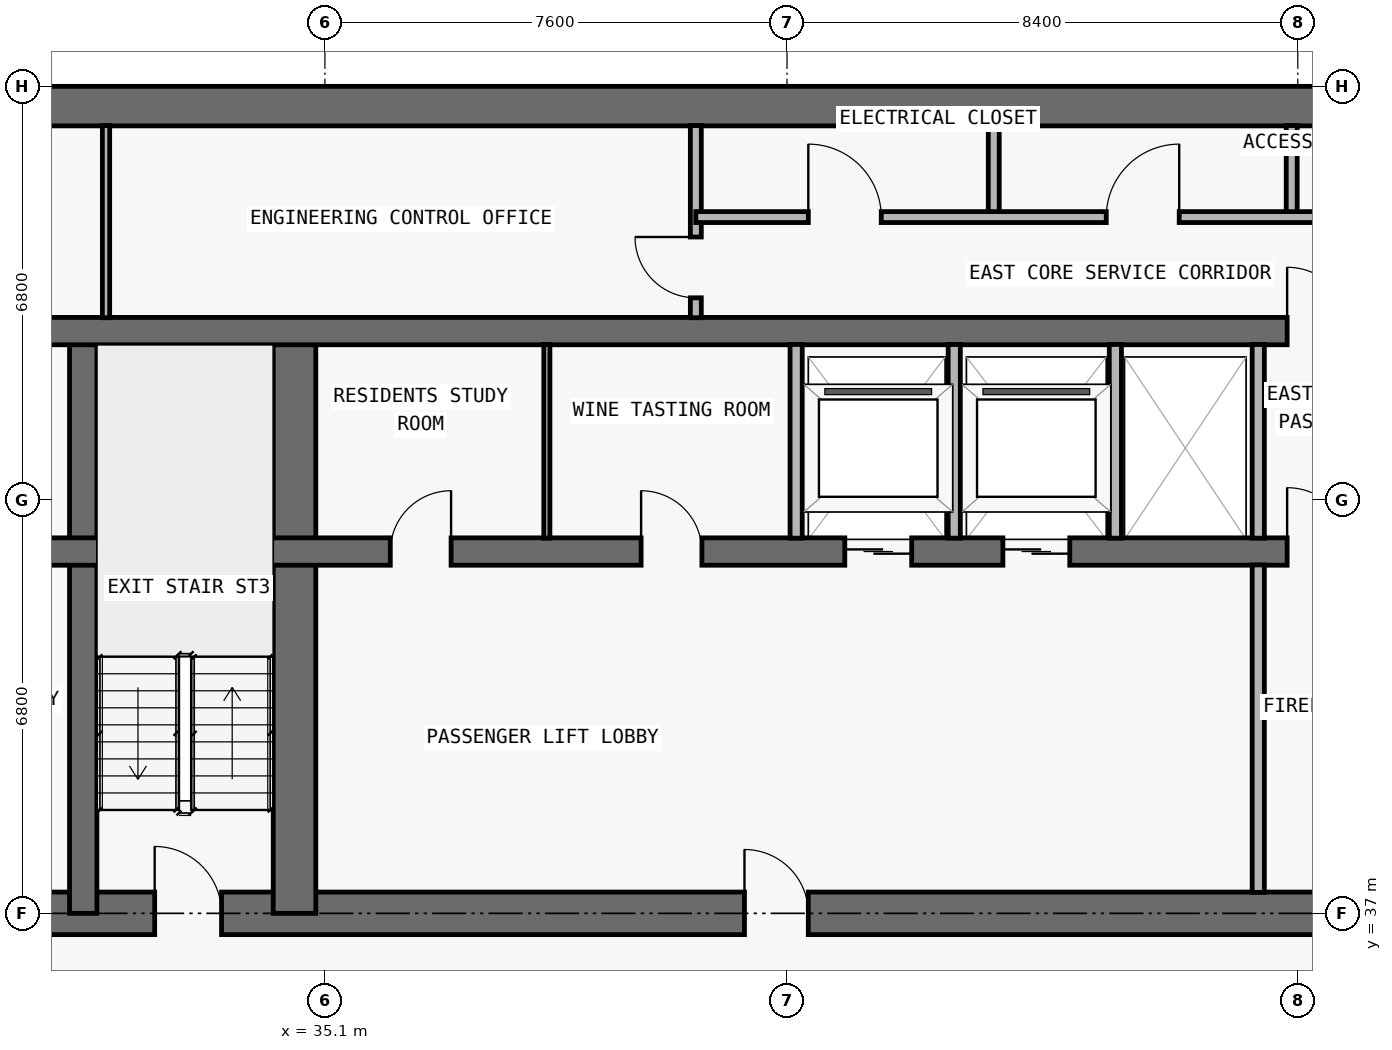
"""IFC4 building model, lengths in metres.
Left out: names, types, materials, properties, quantities, classifications, styles, units other than length and angle.
Written with IfcOpenShell. Run it as: python <this file> out.ifc"""

import sys

from ifc_helpers import new_model, si_unit, direction, frame, frame_2d, origin, place, context, subcontext, project, spatial, rectangle, extrude, element, fill, save


model = new_model("IFC4")
c1 = context("Model", 3, precision=1e-05, world=origin(), true_north=direction((0.0, 1.0)))
c2 = subcontext(c1, "Body", "Model", "MODEL_VIEW")
j1 = project(units=[si_unit("LENGTHUNIT", "METRE"), si_unit("PLANEANGLEUNIT", "RADIAN")], contexts=[c1])
p1 = place(None, origin())
s1 = spatial("IfcSite", under=j1, at=p1, CompositionType="ELEMENT")
p2 = place(p1, origin())
s2 = spatial("IfcBuilding", under=s1, at=p2, CompositionType="ELEMENT")
p3 = place(p2, frame((0.0, 0.0, 163.8)))
s3 = spatial("IfcBuildingStorey", under=s2, at=p3, CompositionType="ELEMENT", Elevation=163.8)
p4 = place(p3, frame((17.95, 37.0, 0.0), z_axis=(0.0, 0.0, 1.0), x_axis=(1.0, 0.0, 0.0)))
e1 = element("IfcWall", 1, at=p4, inside=s3, PredefinedType="SHEAR", context=c2, shape_type="SweptSolid", body=[
    extrude(rectangle(XDim=41.9, YDim=0.7, at=frame_2d((20.95, 0.0))), origin(), (0.0, 0.0, 1.0), 3.05),
])
p5 = place(p4, frame((14.35, 0.0, 0.0)))
e2 = element("IfcOpeningElement", 2, at=p5, cuts=e1, PredefinedType="OPENING", context=c2, shape_type="SweptSolid", body=[
    extrude(rectangle(XDim=1.1, YDim=2.15, at=frame_2d((0.55, 1.075))), frame((0.0, 0.36, 0.0), z_axis=(0.0, -1.0, 0.0), x_axis=(1.0, 0.0, 0.0)), (0.0, 0.0, 1.0), 0.72),
])
p6 = place(p4, frame((6.2, 0.0, 0.0)))
e3 = element("IfcOpeningElement", 3, at=p6, cuts=e1, PredefinedType="OPENING", context=c2, shape_type="SweptSolid", body=[
    extrude(rectangle(XDim=1.05, YDim=2.15, at=frame_2d((0.525, 1.075))), frame((0.0, 0.36, 0.0), z_axis=(0.0, -1.0, 0.0), x_axis=(1.0, 0.0, 0.0)), (0.0, 0.0, 1.0), 0.72),
])
p7 = place(p4, frame((34.7, 0.0, 0.0)))
e4 = element("IfcOpeningElement", 4, at=p7, cuts=e1, PredefinedType="OPENING", context=c2, shape_type="SweptSolid", body=[
    extrude(rectangle(XDim=1.05, YDim=2.15, at=frame_2d((0.525, 1.075))), frame((0.0, 0.36, 0.0), z_axis=(0.0, -1.0, 0.0), x_axis=(1.0, 0.0, 0.0)), (0.0, 0.0, 1.0), 0.72),
])
p8 = place(p4, frame((10.812, 0.0, 0.0)))
e5 = element("IfcOpeningElement", 5, at=p8, cuts=e1, PredefinedType="OPENING", context=c2, shape_type="SweptSolid", body=[
    extrude(rectangle(XDim=1.05, YDim=2.15, at=frame_2d((0.525, 1.075))), frame((0.0, 0.36, 0.0), z_axis=(0.0, -1.0, 0.0), x_axis=(1.0, 0.0, 0.0)), (0.0, 0.0, 1.0), 0.72),
])
p9 = place(p4, frame((24.05, 0.0, 0.0)))
e6 = element("IfcOpeningElement", 6, at=p9, cuts=e1, PredefinedType="OPENING", context=c2, shape_type="SweptSolid", body=[
    extrude(rectangle(XDim=1.05, YDim=2.15, at=frame_2d((0.525, 1.075))), frame((0.0, 0.36, 0.0), z_axis=(0.0, -1.0, 0.0), x_axis=(1.0, 0.0, 0.0)), (0.0, 0.0, 1.0), 0.72),
])
p10 = place(p3, frame((17.95, 50.275, 0.0), z_axis=(0.0, 0.0, 1.0), x_axis=(1.0, 0.0, 0.0)))
e7 = element("IfcWall", 7, at=p10, inside=s3, PredefinedType="SHEAR", context=c2, shape_type="SweptSolid", body=[
    extrude(rectangle(XDim=41.9, YDim=0.65, at=frame_2d((20.95, 0.0))), origin(), (0.0, 0.0, 1.0), 3.05),
])
p11 = place(p3, frame((31.125, 37.0, 0.0), z_axis=(0.0, 0.0, 1.0), x_axis=(0.0, 1.0, 0.0)))
e8 = element("IfcWall", 8, at=p11, inside=s3, PredefinedType="SHEAR", context=c2, shape_type="SweptSolid", body=[
    extrude(rectangle(XDim=9.575, YDim=0.45, at=frame_2d((4.788, 0.0))), origin(), (0.0, 0.0, 1.0), 3.05),
])
p12 = place(p3, frame((34.6, 37.0, 0.0), z_axis=(0.0, 0.0, 1.0), x_axis=(0.0, 1.0, 0.0)))
e9 = element("IfcWall", 9, at=p12, inside=s3, PredefinedType="SHEAR", context=c2, shape_type="SweptSolid", body=[
    extrude(rectangle(XDim=9.575, YDim=0.7, at=frame_2d((4.788, 0.0))), origin(), (0.0, 0.0, 1.0), 3.05),
])
p13 = place(p3, frame((22.25, 42.95, 0.0), z_axis=(0.0, 0.0, 1.0), x_axis=(1.0, 0.0, 0.0)))
e10 = element("IfcWall", 10, at=p13, inside=s3, PredefinedType="SHEAR", context=c2, shape_type="SweptSolid", body=[
    extrude(rectangle(XDim=33.3, YDim=0.45, at=frame_2d((16.65, 0.0))), origin(), (0.0, 0.0, 1.0), 3.05),
])
p14 = place(p13, frame((1.05, 0.0, 0.0)))
e11 = element("IfcOpeningElement", 11, at=p14, cuts=e10, PredefinedType="OPENING", context=c2, shape_type="SweptSolid", body=[
    extrude(rectangle(XDim=1.2, YDim=2.2, at=frame_2d((0.6, 1.1))), frame((0.0, 0.235, 0.0), z_axis=(0.0, -1.0, 0.0), x_axis=(1.0, 0.0, 0.0)), (0.0, 0.0, 1.0), 0.47),
])
p15 = place(p13, frame((31.05, 0.0, 0.0)))
e12 = element("IfcOpeningElement", 12, at=p15, cuts=e10, PredefinedType="OPENING", context=c2, shape_type="SweptSolid", body=[
    extrude(rectangle(XDim=1.2, YDim=2.2, at=frame_2d((0.6, 1.1))), frame((0.0, 0.235, 0.0), z_axis=(0.0, -1.0, 0.0), x_axis=(1.0, 0.0, 0.0)), (0.0, 0.0, 1.0), 0.47),
])
p16 = place(p13, frame((21.4, 0.0, 0.0)))
e13 = element("IfcOpeningElement", 13, at=p16, cuts=e10, PredefinedType="OPENING", context=c2, shape_type="SweptSolid", body=[
    extrude(rectangle(XDim=1.1, YDim=2.2, at=frame_2d((0.55, 1.1))), frame((0.0, 0.235, 0.0), z_axis=(0.0, -1.0, 0.0), x_axis=(1.0, 0.0, 0.0)), (0.0, 0.0, 1.0), 0.47),
])
p17 = place(p13, frame((24.0, 0.0, 0.0)))
e14 = element("IfcOpeningElement", 14, at=p17, cuts=e10, PredefinedType="OPENING", context=c2, shape_type="SweptSolid", body=[
    extrude(rectangle(XDim=1.1, YDim=2.2, at=frame_2d((0.55, 1.1))), frame((0.0, 0.235, 0.0), z_axis=(0.0, -1.0, 0.0), x_axis=(1.0, 0.0, 0.0)), (0.0, 0.0, 1.0), 0.47),
])
p18 = place(p13, frame((3.625, 0.0, 0.0)))
e15 = element("IfcOpeningElement", 15, at=p18, cuts=e10, PredefinedType="OPENING", context=c2, shape_type="SweptSolid", body=[
    extrude(rectangle(XDim=1.05, YDim=2.15, at=frame_2d((0.525, 1.075))), frame((0.0, 0.235, 0.0), z_axis=(0.0, -1.0, 0.0), x_axis=(1.0, 0.0, 0.0)), (0.0, 0.0, 1.0), 0.47),
])
p19 = place(p13, frame((28.675, 0.0, 0.0)))
e16 = element("IfcOpeningElement", 16, at=p19, cuts=e10, PredefinedType="OPENING", context=c2, shape_type="SweptSolid", body=[
    extrude(rectangle(XDim=1.05, YDim=2.15, at=frame_2d((0.525, 1.075))), frame((0.0, 0.235, 0.0), z_axis=(0.0, -1.0, 0.0), x_axis=(1.0, 0.0, 0.0)), (0.0, 0.0, 1.0), 0.47),
])
p20 = place(p13, frame((13.925, 0.0, 0.0)))
e17 = element("IfcOpeningElement", 17, at=p20, cuts=e10, PredefinedType="OPENING", context=c2, shape_type="SweptSolid", body=[
    extrude(rectangle(XDim=1.0, YDim=2.2, at=frame_2d((0.5, 1.1))), frame((0.0, 0.235, 0.0), z_axis=(0.0, -1.0, 0.0), x_axis=(1.0, 0.0, 0.0)), (0.0, 0.0, 1.0), 0.47),
])
p21 = place(p13, frame((18.05, 0.0, 0.0)))
e18 = element("IfcOpeningElement", 18, at=p21, cuts=e10, PredefinedType="OPENING", context=c2, shape_type="SweptSolid", body=[
    extrude(rectangle(XDim=1.0, YDim=2.2, at=frame_2d((0.5, 1.1))), frame((0.0, 0.235, 0.0), z_axis=(0.0, -1.0, 0.0), x_axis=(1.0, 0.0, 0.0)), (0.0, 0.0, 1.0), 0.47),
])
p22 = place(p3, frame((18.3, 46.575, 0.0), z_axis=(0.0, 0.0, 1.0), x_axis=(1.0, 0.0, 0.0)))
e19 = element("IfcWall", 19, at=p22, inside=s3, PredefinedType="SHEAR", context=c2, shape_type="SweptSolid", body=[
    extrude(rectangle(XDim=41.2, YDim=0.45, at=frame_2d((20.6, 0.0))), origin(), (0.0, 0.0, 1.0), 3.05),
])
p23 = place(p22, frame((7.6, 0.0, 0.0)))
e20 = element("IfcOpeningElement", 20, at=p23, cuts=e19, PredefinedType="OPENING", context=c2, shape_type="SweptSolid", body=[
    extrude(rectangle(XDim=1.0, YDim=2.2, at=frame_2d((0.5, 1.1))), frame((0.0, 0.235, 0.0), z_axis=(0.0, -1.0, 0.0), x_axis=(1.0, 0.0, 0.0)), (0.0, 0.0, 1.0), 0.47),
])
p24 = place(p22, frame((32.625, 0.0, 0.0)))
e21 = element("IfcOpeningElement", 21, at=p24, cuts=e19, PredefinedType="OPENING", context=c2, shape_type="SweptSolid", body=[
    extrude(rectangle(XDim=1.05, YDim=2.15, at=frame_2d((0.525, 1.075))), frame((0.0, 0.235, 0.0), z_axis=(0.0, -1.0, 0.0), x_axis=(1.0, 0.0, 0.0)), (0.0, 0.0, 1.0), 0.47),
])
p25 = place(p3, frame((31.5, 46.795, 0.0), z_axis=(0.0, 0.0, 1.0), x_axis=(0.0, 1.0, 0.0)))
e22 = element("IfcWall", 22, at=p25, inside=s3, PredefinedType="PARTITIONING", context=c2, shape_type="SweptSolid", body=[
    extrude(rectangle(XDim=3.16, YDim=0.12, at=frame_2d((1.58, 0.0))), origin(), (0.0, 0.0, 1.0), 3.05),
])
p26 = place(p3, frame((38.75, 43.17, 0.0), z_axis=(0.0, 0.0, 1.0), x_axis=(0.0, 1.0, 0.0)))
e23 = element("IfcWall", 23, at=p26, inside=s3, PredefinedType="MOVABLE", context=c2, shape_type="SweptSolid", body=[
    extrude(rectangle(XDim=3.185, YDim=0.1, at=frame_2d((1.593, 0.0))), origin(), (0.0, 0.0, 1.0), 3.05),
])
p27 = place(p3, frame((41.2, 46.795, 0.0), z_axis=(0.0, 0.0, 1.0), x_axis=(0.0, 1.0, 0.0)))
e24 = element("IfcWall", 24, at=p27, inside=s3, PredefinedType="PARTITIONING", context=c2, shape_type="SweptSolid", body=[
    extrude(rectangle(XDim=3.16, YDim=0.18, at=frame_2d((1.58, 0.0))), origin(), (0.0, 0.0, 1.0), 3.05),
])
p28 = place(p27, frame((0.327, 0.0, 0.0)))
e25 = element("IfcOpeningElement", 25, at=p28, cuts=e24, PredefinedType="OPENING", context=c2, shape_type="SweptSolid", body=[
    extrude(rectangle(XDim=1.0, YDim=2.2, at=frame_2d((0.5, 1.1))), frame((0.0, 0.1, 0.0), z_axis=(0.0, -1.0, 0.0), x_axis=(1.0, 0.0, 0.0)), (0.0, 0.0, 1.0), 0.2),
])
for number, where, z_axis, x_axis in (
    (26, (42.85, 43.17, 0.0), (0.0, 0.0, 1.0), (0.0, 1.0, 0.0)),
    (27, (45.45, 43.17, 0.0), (0.0, 0.0, 1.0), (0.0, 1.0, 0.0)),
):
    element("IfcWall", number, at=place(p3, frame(where, z_axis=z_axis, x_axis=x_axis)), inside=s3, PredefinedType="PARTITIONING", context=c2, shape_type="SweptSolid", body=[
        extrude(rectangle(XDim=3.185, YDim=0.2, at=frame_2d((1.593, 0.0))), origin(), (0.0, 0.0, 1.0), 3.05),
    ])
p29 = place(p3, frame((46.1, 48.45, 0.0), z_axis=(0.0, 0.0, 1.0), x_axis=(0.0, 1.0, 0.0)))
e28 = element("IfcWall", 28, at=p29, inside=s3, PredefinedType="PARTITIONING", context=c2, shape_type="SweptSolid", body=[
    extrude(rectangle(XDim=1.505, YDim=0.18, at=frame_2d((0.752, 0.0))), origin(), (0.0, 0.0, 1.0), 3.05),
])
p30 = place(p3, frame((48.1, 43.17, 0.0), z_axis=(0.0, 0.0, 1.0), x_axis=(0.0, 1.0, 0.0)))
e29 = element("IfcWall", 29, at=p30, inside=s3, PredefinedType="PARTITIONING", context=c2, shape_type="SweptSolid", body=[
    extrude(rectangle(XDim=3.185, YDim=0.2, at=frame_2d((1.593, 0.0))), origin(), (0.0, 0.0, 1.0), 3.05),
])
p31 = place(p3, frame((50.45, 37.345, 0.0), z_axis=(0.0, 0.0, 1.0), x_axis=(0.0, 1.0, 0.0)))
e30 = element("IfcWall", 30, at=p31, inside=s3, PredefinedType="PARTITIONING", context=c2, shape_type="SweptSolid", body=[
    extrude(rectangle(XDim=5.385, YDim=0.2, at=frame_2d((2.692, 0.0))), origin(), (0.0, 0.0, 1.0), 3.05),
])
p32 = place(p3, frame((50.45, 43.17, 0.0), z_axis=(0.0, 0.0, 1.0), x_axis=(0.0, 1.0, 0.0)))
e31 = element("IfcWall", 31, at=p32, inside=s3, PredefinedType="PARTITIONING", context=c2, shape_type="SweptSolid", body=[
    extrude(rectangle(XDim=3.185, YDim=0.2, at=frame_2d((1.593, 0.0))), origin(), (0.0, 0.0, 1.0), 3.05),
])
p33 = place(p3, frame((51.0, 48.45, 0.0), z_axis=(0.0, 0.0, 1.0), x_axis=(0.0, 1.0, 0.0)))
e32 = element("IfcWall", 32, at=p33, inside=s3, PredefinedType="PARTITIONING", context=c2, shape_type="SweptSolid", body=[
    extrude(rectangle(XDim=1.505, YDim=0.18, at=frame_2d((0.752, 0.0))), origin(), (0.0, 0.0, 1.0), 3.05),
])
p34 = place(p3, frame((41.2, 48.45, 0.0), z_axis=(0.0, 0.0, 1.0), x_axis=(1.0, 0.0, 0.0)))
e33 = element("IfcWall", 33, at=p34, inside=s3, PredefinedType="PARTITIONING", context=c2, shape_type="SweptSolid", body=[
    extrude(rectangle(XDim=14.7, YDim=0.18, at=frame_2d((7.35, 0.0))), origin(), (0.0, 0.0, 1.0), 3.05),
])
p35 = place(p34, frame((1.85, 0.0, 0.0)))
e34 = element("IfcOpeningElement", 34, at=p35, cuts=e33, PredefinedType="OPENING", context=c2, shape_type="SweptSolid", body=[
    extrude(rectangle(XDim=1.2, YDim=2.2, at=frame_2d((0.6, 1.1))), frame((0.0, 0.1, 0.0), z_axis=(0.0, -1.0, 0.0), x_axis=(1.0, 0.0, 0.0)), (0.0, 0.0, 1.0), 0.2),
])
p36 = place(p34, frame((6.75, 0.0, 0.0)))
e35 = element("IfcOpeningElement", 35, at=p36, cuts=e33, PredefinedType="OPENING", context=c2, shape_type="SweptSolid", body=[
    extrude(rectangle(XDim=1.2, YDim=2.2, at=frame_2d((0.6, 1.1))), frame((0.0, 0.1, 0.0), z_axis=(0.0, -1.0, 0.0), x_axis=(1.0, 0.0, 0.0)), (0.0, 0.0, 1.0), 0.2),
])
p37 = place(p34, frame((11.825, 0.0, 0.0)))
e36 = element("IfcOpeningElement", 36, at=p37, cuts=e33, PredefinedType="OPENING", context=c2, shape_type="SweptSolid", body=[
    extrude(rectangle(XDim=0.85, YDim=2.1, at=frame_2d((0.425, 1.05))), frame((0.0, 0.1, 0.0), z_axis=(0.0, -1.0, 0.0), x_axis=(1.0, 0.0, 0.0)), (0.0, 0.0, 1.0), 0.2),
])
p38 = place(p16, origin())
e37 = element("IfcDoor", 37, at=p38, inside=s3, OperationType="DOUBLE_DOOR_SLIDING", PredefinedType="DOOR", context=c2, shape_type="SweptSolid", body=[
    extrude(rectangle(XDim=1.1, YDim=2.2, at=frame_2d((0.55, 1.1))), frame((0.0, 0.025, 0.0), z_axis=(0.0, -1.0, 0.0), x_axis=(1.0, 0.0, 0.0)), (0.0, 0.0, 1.0), 0.05),
])
fill(e13, e37)
p39 = place(p17, origin())
e38 = element("IfcDoor", 38, at=p39, inside=s3, OperationType="DOUBLE_DOOR_SLIDING", PredefinedType="DOOR", context=c2, shape_type="SweptSolid", body=[
    extrude(rectangle(XDim=1.1, YDim=2.2, at=frame_2d((0.55, 1.1))), frame((0.0, 0.025, 0.0), z_axis=(0.0, -1.0, 0.0), x_axis=(1.0, 0.0, 0.0)), (0.0, 0.0, 1.0), 0.05),
])
fill(e14, e38)
p40 = place(p5, origin())
e39 = element("IfcDoor", 39, at=p40, inside=s3, OperationType="SINGLE_SWING_LEFT", PredefinedType="DOOR", context=c2, shape_type="SweptSolid", body=[
    extrude(rectangle(XDim=1.1, YDim=2.15, at=frame_2d((0.55, 1.075))), frame((0.0, 0.025, 0.0), z_axis=(0.0, -1.0, 0.0), x_axis=(1.0, 0.0, 0.0)), (0.0, 0.0, 1.0), 0.05),
])
fill(e2, e39)
p41 = place(p19, origin())
e40 = element("IfcDoor", 40, at=p41, inside=s3, OperationType="SINGLE_SWING_LEFT", PredefinedType="DOOR", context=c2, shape_type="SweptSolid", body=[
    extrude(rectangle(XDim=1.05, YDim=2.15, at=frame_2d((0.525, 1.075))), frame((0.0, 0.025, 0.0), z_axis=(0.0, -1.0, 0.0), x_axis=(1.0, 0.0, 0.0)), (0.0, 0.0, 1.0), 0.05),
])
fill(e16, e40)
p42 = place(p9, origin())
e41 = element("IfcDoor", 41, at=p42, inside=s3, OperationType="SINGLE_SWING_LEFT", PredefinedType="DOOR", context=c2, shape_type="SweptSolid", body=[
    extrude(rectangle(XDim=1.05, YDim=2.15, at=frame_2d((0.525, 1.075))), frame((0.0, 0.025, 0.0), z_axis=(0.0, -1.0, 0.0), x_axis=(1.0, 0.0, 0.0)), (0.0, 0.0, 1.0), 0.05),
])
fill(e6, e41)
p43 = place(p20, origin())
e42 = element("IfcDoor", 42, at=p43, inside=s3, OperationType="SINGLE_SWING_RIGHT", PredefinedType="DOOR", context=c2, shape_type="SweptSolid", body=[
    extrude(rectangle(XDim=1.0, YDim=2.2, at=frame_2d((0.5, 1.1))), frame((0.0, 0.025, 0.0), z_axis=(0.0, -1.0, 0.0), x_axis=(1.0, 0.0, 0.0)), (0.0, 0.0, 1.0), 0.05),
])
fill(e17, e42)
p44 = place(p21, origin())
e43 = element("IfcDoor", 43, at=p44, inside=s3, OperationType="SINGLE_SWING_LEFT", PredefinedType="DOOR", context=c2, shape_type="SweptSolid", body=[
    extrude(rectangle(XDim=1.0, YDim=2.2, at=frame_2d((0.5, 1.1))), frame((0.0, 0.025, 0.0), z_axis=(0.0, -1.0, 0.0), x_axis=(1.0, 0.0, 0.0)), (0.0, 0.0, 1.0), 0.05),
])
fill(e18, e43)
p45 = place(p24, origin())
e44 = element("IfcDoor", 44, at=p45, inside=s3, OperationType="SINGLE_SWING_LEFT", PredefinedType="DOOR", context=c2, shape_type="SweptSolid", body=[
    extrude(rectangle(XDim=1.05, YDim=2.15, at=frame_2d((0.525, 1.075))), frame((0.0, 0.025, 0.0), z_axis=(0.0, -1.0, 0.0), x_axis=(1.0, 0.0, 0.0)), (0.0, 0.0, 1.0), 0.05),
])
fill(e21, e44)
p46 = place(p28, origin())
e45 = element("IfcDoor", 45, at=p46, inside=s3, OperationType="SINGLE_SWING_RIGHT", PredefinedType="DOOR", context=c2, shape_type="SweptSolid", body=[
    extrude(rectangle(XDim=1.0, YDim=2.2, at=frame_2d((0.5, 1.1))), frame((0.0, 0.025, 0.0), z_axis=(0.0, -1.0, 0.0), x_axis=(1.0, 0.0, 0.0)), (0.0, 0.0, 1.0), 0.05),
])
fill(e25, e45)
p47 = place(p35, origin())
e46 = element("IfcDoor", 46, at=p47, inside=s3, OperationType="SINGLE_SWING_LEFT", PredefinedType="DOOR", context=c2, shape_type="SweptSolid", body=[
    extrude(rectangle(XDim=1.2, YDim=2.2, at=frame_2d((0.6, 1.1))), frame((0.0, 0.025, 0.0), z_axis=(0.0, -1.0, 0.0), x_axis=(1.0, 0.0, 0.0)), (0.0, 0.0, 1.0), 0.05),
])
fill(e34, e46)
p48 = place(p36, origin())
e47 = element("IfcDoor", 47, at=p48, inside=s3, OperationType="SINGLE_SWING_RIGHT", PredefinedType="DOOR", context=c2, shape_type="SweptSolid", body=[
    extrude(rectangle(XDim=1.2, YDim=2.2, at=frame_2d((0.6, 1.1))), frame((0.0, 0.025, 0.0), z_axis=(0.0, -1.0, 0.0), x_axis=(1.0, 0.0, 0.0)), (0.0, 0.0, 1.0), 0.05),
])
fill(e35, e47)
save(model, sys.argv[1])
